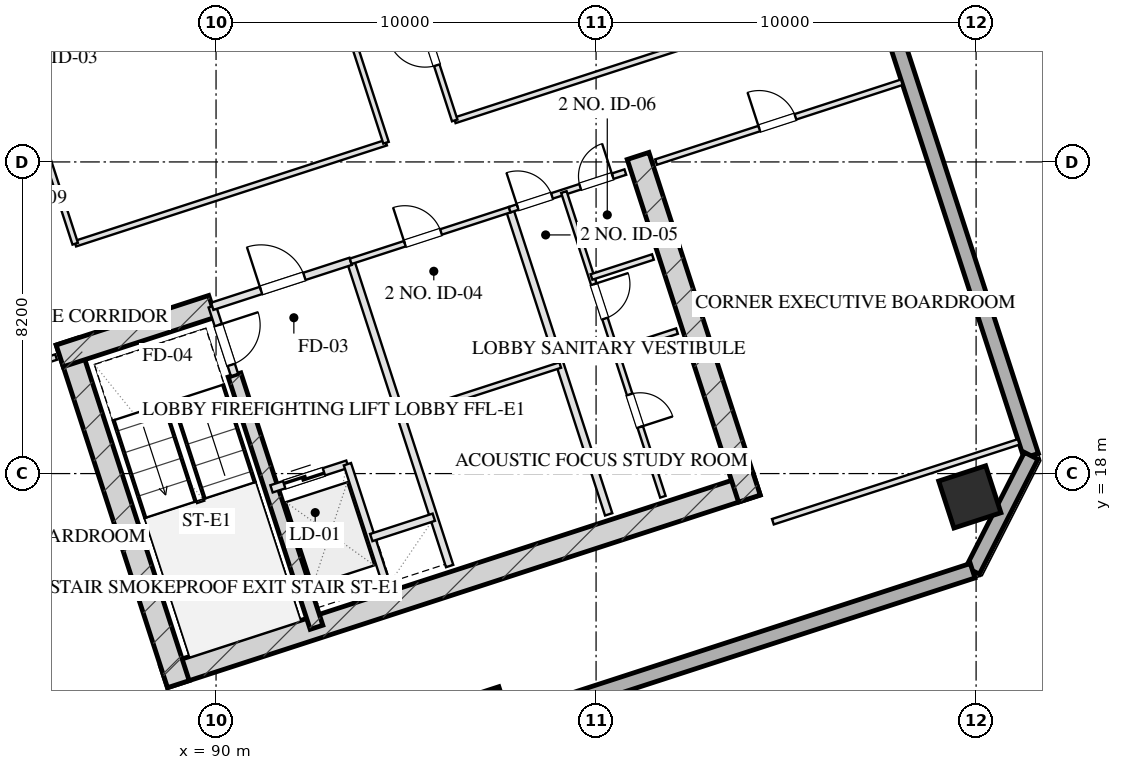
"""IFC4 building model, lengths in metres.
Left out: names, types, materials, properties, quantities, classifications, styles, units other than length and angle.
Written with IfcOpenShell. Run it as: python <this file> out.ifc"""

import sys

from ifc_helpers import new_model, si_unit, direction, frame, frame_2d, origin, origin_2d, place, context, subcontext, project, spatial, rectangle, hollow_rectangle, extrude, element, fill, save


model = new_model("IFC4")
c1 = context("Model", 3, precision=1e-05, world=origin(), true_north=direction((0.0, 1.0)))
c2 = subcontext(c1, "Body", "Model", "MODEL_VIEW")
j1 = project(units=[si_unit("LENGTHUNIT", "METRE"), si_unit("PLANEANGLEUNIT", "RADIAN")], contexts=[c1])
p1 = place(None, origin())
s1 = spatial("IfcSite", under=j1, at=p1, CompositionType="ELEMENT")
p2 = place(p1, origin())
s2 = spatial("IfcBuilding", under=s1, at=p2, CompositionType="ELEMENT")
p3 = place(p2, frame((0.0, 0.0, 170.2)))
s3 = spatial("IfcBuildingStorey", under=s2, at=p3, CompositionType="ELEMENT", Elevation=170.2)
p4 = place(p3, frame((88.63, 12.652, 0.0), z_axis=(0.0, 0.0, 1.0), x_axis=(0.95105714907, 0.309015046886, 0.0)))
e1 = element("IfcWall", 1, at=p4, inside=s3, PredefinedType="SHEAR", context=c2, shape_type="SweptSolid", body=[
    extrude(rectangle(XDim=16.4, YDim=0.6, at=frame_2d((8.2, 0.0))), origin(), (0.0, 0.0, 1.0), 3.45),
])
p5 = place(p3, frame((86.078, 21.475, 0.0), z_axis=(0.0, 0.0, 1.0), x_axis=(0.309017938678, -0.951056209472, 0.0)))
e2 = element("IfcWall", 2, at=p5, inside=s3, PredefinedType="SHEAR", context=c2, shape_type="SweptSolid", body=[
    extrude(rectangle(XDim=9.48, YDim=0.6, at=frame_2d((4.74, 0.0))), origin(), (0.0, 0.0, 1.0), 3.45),
])
p6 = place(p3, frame((101.105, 26.358, 0.0), z_axis=(0.0, 0.0, 1.0), x_axis=(0.309010370028, -0.95105866865, 0.0)))
e3 = element("IfcWall", 3, at=p6, inside=s3, PredefinedType="SHEAR", context=c2, shape_type="SweptSolid", body=[
    extrude(rectangle(XDim=9.48, YDim=0.6, at=frame_2d((4.74, 0.0))), origin(), (0.0, 0.0, 1.0), 3.45),
])
p7 = place(p3, frame((90.486, 20.594, 0.0), z_axis=(0.0, 0.0, 1.0), x_axis=(0.309020428229, -0.951055400562, 0.0)))
e4 = element("IfcWall", 4, at=p7, inside=s3, PredefinedType="SHEAR", context=c2, shape_type="SweptSolid", body=[
    extrude(rectangle(XDim=6.98, YDim=0.35, at=frame_2d((3.49, 0.0))), origin(), (0.0, 0.0, 1.0), 3.45),
])
p8 = place(p3, frame((85.886, 21.097, 0.0), z_axis=(0.0, 0.0, 1.0), x_axis=(0.951068073652, 0.308981422225, 0.0)))
e5 = element("IfcWall", 5, at=p8, inside=s3, PredefinedType="SHEAR", context=c2, shape_type="SweptSolid", body=[
    extrude(rectangle(XDim=4.22, YDim=0.6, at=frame_2d((2.11, 0.0))), origin(), (0.0, 0.0, 1.0), 3.45),
])
p9 = place(p3, frame((109.835, 17.386, 0.0), z_axis=(0.0, 0.0, 1.0), x_axis=(0.951056516295, 0.309016994375, 0.0)))
e6 = element("IfcColumn", 6, at=p9, inside=s3, PredefinedType="COLUMN", context=c2, shape_type="SweptSolid", body=[
    extrude(hollow_rectangle(XDim=1.3, YDim=1.3, WallThickness=0.045, at=origin_2d()), origin(), (0.0, 0.0, 1.0), 3.451),
])
p10 = place(p3, frame((97.185, 11.888, 0.0), z_axis=(0.0, 0.0, 1.0), x_axis=(0.951056516295, 0.309016994375, 0.0)))
e7 = element("IfcColumn", 7, at=p10, inside=s3, PredefinedType="COLUMN", context=c2, shape_type="SweptSolid", body=[
    extrude(hollow_rectangle(XDim=0.8, YDim=0.8, WallThickness=0.028, at=origin_2d()), origin(), (0.0, 0.0, 1.0), 3.451),
])
p11 = place(p3, frame((98.224, 59.173, 0.0), z_axis=(0.0, 0.0, 1.0), x_axis=(0.309014228706, -0.951057414911, 0.0)))
e8 = element("IfcWall", 8, at=p11, inside=s3, PredefinedType="SOLIDWALL", context=c2, shape_type="SweptSolid", body=[
    extrude(rectangle(XDim=42.8, YDim=0.4, at=frame_2d((21.4, 0.0))), origin(), (0.0, 0.0, 1.0), 2.61),
])
p12 = place(p11, frame((26.675, 0.0, 0.75)))
e9 = element("IfcOpeningElement", 9, at=p12, cuts=e8, PredefinedType="OPENING", context=c2, shape_type="SweptSolid", body=[
    extrude(rectangle(XDim=2.25, YDim=1.46, at=frame_2d((1.125, 0.73))), frame((0.0, 0.21, 0.0), z_axis=(0.0, -1.0, 0.0), x_axis=(1.0, 0.0, 0.0)), (0.0, 0.0, 1.0), 0.42),
])
p13 = place(p11, frame((22.875, 0.0, 0.75)))
e10 = element("IfcOpeningElement", 10, at=p13, cuts=e8, PredefinedType="OPENING", context=c2, shape_type="SweptSolid", body=[
    extrude(rectangle(XDim=2.25, YDim=1.46, at=frame_2d((1.125, 0.73))), frame((0.0, 0.21, 0.0), z_axis=(0.0, -1.0, 0.0), x_axis=(1.0, 0.0, 0.0)), (0.0, 0.0, 1.0), 0.42),
])
p14 = place(p11, frame((17.675, 0.0, 0.75)))
e11 = element("IfcOpeningElement", 11, at=p14, cuts=e8, PredefinedType="OPENING", context=c2, shape_type="SweptSolid", body=[
    extrude(rectangle(XDim=2.25, YDim=1.46, at=frame_2d((1.125, 0.73))), frame((0.0, 0.21, 0.0), z_axis=(0.0, -1.0, 0.0), x_axis=(1.0, 0.0, 0.0)), (0.0, 0.0, 1.0), 0.42),
])
p15 = place(p11, frame((13.875, 0.0, 0.75)))
e12 = element("IfcOpeningElement", 12, at=p15, cuts=e8, PredefinedType="OPENING", context=c2, shape_type="SweptSolid", body=[
    extrude(rectangle(XDim=2.25, YDim=1.46, at=frame_2d((1.125, 0.73))), frame((0.0, 0.21, 0.0), z_axis=(0.0, -1.0, 0.0), x_axis=(1.0, 0.0, 0.0)), (0.0, 0.0, 1.0), 0.42),
])
p16 = place(p3, frame((111.449, 18.468, 0.0), z_axis=(0.0, 0.0, 1.0), x_axis=(-0.454019523198, -0.890991735402, 0.0)))
e13 = element("IfcWall", 13, at=p16, inside=s3, PredefinedType="SOLIDWALL", context=c2, shape_type="SweptSolid", body=[
    extrude(rectangle(XDim=3.394, YDim=0.4, at=frame_2d((1.697, 0.0))), origin(), (0.0, 0.0, 1.0), 2.61),
])
p17 = place(p3, frame((109.908, 15.444, 0.0), z_axis=(0.0, 0.0, 1.0), x_axis=(-0.951057580055, -0.30901372044, 0.0)))
e14 = element("IfcWall", 14, at=p17, inside=s3, PredefinedType="SOLIDWALL", context=c2, shape_type="SweptSolid", body=[
    extrude(rectangle(XDim=26.4, YDim=0.4, at=frame_2d((13.2, 0.0))), origin(), (0.0, 0.0, 1.0), 2.61),
])
p18 = place(p3, frame((89.899, 22.401, 0.0), z_axis=(0.0, 0.0, 1.0), x_axis=(0.308932062672, -0.951084108086, 0.0)))
e15 = element("IfcWall", 15, at=p18, inside=s3, PredefinedType="PARTITIONING", context=c2, shape_type="SweptSolid", body=[
    extrude(rectangle(XDim=1.9, YDim=0.2, at=frame_2d((0.95, 0.0))), origin(), (0.0, 0.0, 1.0), 3.175),
])
p19 = place(p18, frame((0.52, 0.0, 0.0)))
e16 = element("IfcOpeningElement", 16, at=p19, cuts=e15, PredefinedType="OPENING", context=c2, shape_type="SweptSolid", body=[
    extrude(rectangle(XDim=1.1, YDim=2.05, at=frame_2d((0.55, 1.025))), frame((0.0, 0.11, 0.0), z_axis=(0.0, -1.0, 0.0), x_axis=(1.0, 0.0, 0.0)), (0.0, 0.0, 1.0), 0.22),
])
p20 = place(p3, frame((93.542, 23.585, 0.0), z_axis=(0.0, 0.0, 1.0), x_axis=(0.309042196757, -0.951048327176, 0.0)))
e17 = element("IfcWall", 17, at=p20, inside=s3, PredefinedType="PARTITIONING", context=c2, shape_type="SweptSolid", body=[
    extrude(rectangle(XDim=8.43, YDim=0.2, at=frame_2d((4.215, 0.0))), origin(), (0.0, 0.0, 1.0), 3.175),
])
p21 = place(p3, frame((89.899, 22.401, 0.0), z_axis=(0.0, 0.0, 1.0), x_axis=(0.951046716504, 0.309047153403, 0.0)))
e18 = element("IfcWall", 18, at=p21, inside=s3, PredefinedType="PARTITIONING", context=c2, shape_type="SweptSolid", body=[
    extrude(rectangle(XDim=3.83, YDim=0.2, at=frame_2d((1.915, 0.0))), origin(), (0.0, 0.0, 1.0), 3.175),
])
p22 = place(p21, frame((1.35, 0.0, 0.0)))
e19 = element("IfcOpeningElement", 19, at=p22, cuts=e18, PredefinedType="OPENING", context=c2, shape_type="SweptSolid", body=[
    extrude(rectangle(XDim=1.2, YDim=2.05, at=frame_2d((0.6, 1.025))), frame((0.0, 0.11, 0.0), z_axis=(0.0, -1.0, 0.0), x_axis=(1.0, 0.0, 0.0)), (0.0, 0.0, 1.0), 0.22),
])
p23 = place(p3, frame((91.46, 17.598, 0.0), z_axis=(0.0, 0.0, 1.0), x_axis=(0.951062257173, 0.308999325213, 0.0)))
e20 = element("IfcWall", 20, at=p23, inside=s3, PredefinedType="PARTITIONING", context=c2, shape_type="SweptSolid", body=[
    extrude(rectangle(XDim=2.1, YDim=0.2, at=frame_2d((1.05, 0.0))), origin(), (0.0, 0.0, 1.0), 3.175),
])
p24 = place(p23, frame((0.35, 0.0, 0.0)))
e21 = element("IfcOpeningElement", 21, at=p24, cuts=e20, PredefinedType="OPENING", context=c2, shape_type="SweptSolid", body=[
    extrude(rectangle(XDim=1.1, YDim=2.05, at=frame_2d((0.55, 1.025))), frame((0.0, 0.11, 0.0), z_axis=(0.0, -1.0, 0.0), x_axis=(1.0, 0.0, 0.0)), (0.0, 0.0, 1.0), 0.22),
])
p25 = place(p3, frame((93.457, 18.247, 0.0), z_axis=(0.0, 0.0, 1.0), x_axis=(0.3089935693, -0.951064127245, 0.0)))
e22 = element("IfcWall", 22, at=p25, inside=s3, PredefinedType="PARTITIONING", context=c2, shape_type="SweptSolid", body=[
    extrude(rectangle(XDim=3.7, YDim=0.2, at=frame_2d((1.85, 0.0))), origin(), (0.0, 0.0, 1.0), 3.175),
])
p26 = place(p3, frame((94.084, 16.317, 0.0), z_axis=(0.0, 0.0, 1.0), x_axis=(0.951041328149, 0.309063734775, 0.0)))
e23 = element("IfcWall", 23, at=p26, inside=s3, PredefinedType="PARTITIONING", context=c2, shape_type="SweptSolid", body=[
    extrude(rectangle(XDim=1.73, YDim=0.2, at=frame_2d((0.865, 0.0))), origin(), (0.0, 0.0, 1.0), 3.175),
])
p27 = place(p3, frame((97.727, 24.944, 0.0), z_axis=(0.0, 0.0, 1.0), x_axis=(0.309016001439, -0.951056838919, 0.0)))
e24 = element("IfcWall", 24, at=p27, inside=s3, PredefinedType="PARTITIONING", context=c2, shape_type="SweptSolid", body=[
    extrude(rectangle(XDim=8.43, YDim=0.2, at=frame_2d((4.215, 0.0))), origin(), (0.0, 0.0, 1.0), 3.175),
])
p28 = place(p3, frame((93.542, 23.585, 0.0), z_axis=(0.0, 0.0, 1.0), x_axis=(0.951063829732, 0.308994485023, 0.0)))
e25 = element("IfcWall", 25, at=p28, inside=s3, PredefinedType="PARTITIONING", context=c2, shape_type="SweptSolid", body=[
    extrude(rectangle(XDim=4.4, YDim=0.15, at=frame_2d((2.2, 0.0))), origin(), (0.0, 0.0, 1.0), 3.175),
])
p29 = place(p28, frame((1.5, 0.0, 0.0)))
e26 = element("IfcOpeningElement", 26, at=p29, cuts=e25, PredefinedType="OPENING", context=c2, shape_type="SweptSolid", body=[
    extrude(rectangle(XDim=1.0, YDim=2.05, at=frame_2d((0.5, 1.025))), frame((0.0, 0.085, 0.0), z_axis=(0.0, -1.0, 0.0), x_axis=(1.0, 0.0, 0.0)), (0.0, 0.0, 1.0), 0.17),
])
p30 = place(p3, frame((94.871, 19.495, 0.0), z_axis=(0.0, 0.0, 1.0), x_axis=(0.951042223598, 0.309060979314, 0.0)))
e27 = element("IfcWall", 27, at=p30, inside=s3, PredefinedType="PARTITIONING", context=c2, shape_type="SweptSolid", body=[
    extrude(rectangle(XDim=4.4, YDim=0.15, at=frame_2d((2.2, 0.0))), origin(), (0.0, 0.0, 1.0), 3.175),
])
p31 = place(p3, frame((97.727, 24.944, 0.0), z_axis=(0.0, 0.0, 1.0), x_axis=(0.951036872128, 0.309077446369, 0.0)))
e28 = element("IfcWall", 28, at=p31, inside=s3, PredefinedType="PARTITIONING", context=c2, shape_type="SweptSolid", body=[
    extrude(rectangle(XDim=3.2, YDim=0.15, at=frame_2d((1.6, 0.0))), origin(), (0.0, 0.0, 1.0), 3.175),
])
p32 = place(p31, frame((0.22, 0.0, 0.0)))
e29 = element("IfcOpeningElement", 29, at=p32, cuts=e28, PredefinedType="OPENING", context=c2, shape_type="SweptSolid", body=[
    extrude(rectangle(XDim=0.95, YDim=2.05, at=frame_2d((0.475, 1.025))), frame((0.0, 0.085, 0.0), z_axis=(0.0, -1.0, 0.0), x_axis=(1.0, 0.0, 0.0)), (0.0, 0.0, 1.0), 0.17),
])
p33 = place(p31, frame((1.95, 0.0, 0.0)))
e30 = element("IfcOpeningElement", 30, at=p33, cuts=e28, PredefinedType="OPENING", context=c2, shape_type="SweptSolid", body=[
    extrude(rectangle(XDim=0.9, YDim=2.05, at=frame_2d((0.45, 1.025))), frame((0.0, 0.085, 0.0), z_axis=(0.0, -1.0, 0.0), x_axis=(1.0, 0.0, 0.0)), (0.0, 0.0, 1.0), 0.17),
])
p34 = place(p3, frame((99.153, 25.408, 0.0), z_axis=(0.0, 0.0, 1.0), x_axis=(0.309016001439, -0.951056838919, 0.0)))
e31 = element("IfcWall", 31, at=p34, inside=s3, PredefinedType="PARTITIONING", context=c2, shape_type="SweptSolid", body=[
    extrude(rectangle(XDim=8.43, YDim=0.15, at=frame_2d((4.215, 0.0))), origin(), (0.0, 0.0, 1.0), 3.175),
])
p35 = place(p34, frame((2.55, 0.0, 0.0)))
e32 = element("IfcOpeningElement", 32, at=p35, cuts=e31, PredefinedType="OPENING", context=c2, shape_type="SweptSolid", body=[
    extrude(rectangle(XDim=0.95, YDim=2.05, at=frame_2d((0.475, 1.025))), frame((0.0, 0.085, 0.0), z_axis=(0.0, -1.0, 0.0), x_axis=(1.0, 0.0, 0.0)), (0.0, 0.0, 1.0), 0.17),
])
p36 = place(p34, frame((5.6, 0.0, 0.0)))
e33 = element("IfcOpeningElement", 33, at=p36, cuts=e31, PredefinedType="OPENING", context=c2, shape_type="SweptSolid", body=[
    extrude(rectangle(XDim=0.9, YDim=2.05, at=frame_2d((0.45, 1.025))), frame((0.0, 0.085, 0.0), z_axis=(0.0, -1.0, 0.0), x_axis=(1.0, 0.0, 0.0)), (0.0, 0.0, 1.0), 0.17),
])
for number, where, z_axis, x_axis in (
    (34, (100.513, 21.223, 0.0), (0.0, 0.0, 1.0), (0.951, 0.309, 0.0)),
    (35, (99.879, 23.173, 0.0), (0.0, 0.0, 1.0), (0.951, 0.309, 0.0)),
):
    element("IfcWall", number, at=place(p3, frame(where, z_axis=z_axis, x_axis=x_axis)), inside=s3, PredefinedType="PARTITIONING", context=c2, shape_type="SweptSolid", body=[
        extrude(rectangle(XDim=1.7, YDim=0.15, at=frame_2d((0.85, 0.0))), origin(), (0.0, 0.0, 1.0), 3.175),
    ])
p37 = place(p3, frame((78.753, 18.78, 0.0), z_axis=(0.0, 0.0, 1.0), x_axis=(0.951060977215, 0.309003264738, 0.0)))
e36 = element("IfcWall", 36, at=p37, inside=s3, PredefinedType="PARTITIONING", context=c2, shape_type="SweptSolid", body=[
    extrude(rectangle(XDim=7.4, YDim=0.15, at=frame_2d((3.7, 0.0))), origin(), (0.0, 0.0, 1.0), 3.175),
])
p38 = place(p37, frame((3.108, 0.0, 0.0)))
e37 = element("IfcOpeningElement", 37, at=p38, cuts=e36, PredefinedType="OPENING", context=c2, shape_type="SweptSolid", body=[
    extrude(rectangle(XDim=1.0, YDim=2.05, at=frame_2d((0.5, 1.025))), frame((0.0, 0.085, 0.0), z_axis=(0.0, -1.0, 0.0), x_axis=(1.0, 0.0, 0.0)), (0.0, 0.0, 1.0), 0.17),
])
p39 = place(p3, frame((104.653, 16.733, 0.0), z_axis=(0.0, 0.0, 1.0), x_axis=(0.951054383043, 0.309023559774, 0.0)))
e38 = element("IfcWall", 38, at=p39, inside=s3, PredefinedType="PARTITIONING", context=c2, shape_type="SweptSolid", body=[
    extrude(rectangle(XDim=6.8, YDim=0.15, at=frame_2d((3.4, 0.0))), origin(), (0.0, 0.0, 1.0), 3.175),
])
p40 = place(p3, frame((101.578, 26.196, 0.0), z_axis=(0.0, 0.0, 1.0), x_axis=(0.951064934653, 0.308991084134, 0.0)))
e39 = element("IfcWall", 39, at=p40, inside=s3, PredefinedType="PARTITIONING", context=c2, shape_type="SweptSolid", body=[
    extrude(rectangle(XDim=6.8, YDim=0.15, at=frame_2d((3.4, 0.0))), origin(), (0.0, 0.0, 1.0), 3.175),
])
p41 = place(p40, frame((2.856, 0.0, 0.0)))
e40 = element("IfcOpeningElement", 40, at=p41, cuts=e39, PredefinedType="OPENING", context=c2, shape_type="SweptSolid", body=[
    extrude(rectangle(XDim=1.0, YDim=2.05, at=frame_2d((0.5, 1.025))), frame((0.0, 0.085, 0.0), z_axis=(0.0, -1.0, 0.0), x_axis=(1.0, 0.0, 0.0)), (0.0, 0.0, 1.0), 0.17),
])
p42 = place(p3, frame((86.294, 24.048, 0.0), z_axis=(0.0, 0.0, 1.0), x_axis=(0.951052008164, 0.309030868631, 0.0)))
e41 = element("IfcWall", 41, at=p42, inside=s3, PredefinedType="PARTITIONING", context=c2, shape_type="SweptSolid", body=[
    extrude(rectangle(XDim=8.6, YDim=0.15, at=frame_2d((4.3, 0.0))), origin(), (0.0, 0.0, 1.0), 3.175),
])
p43 = place(p3, frame((96.28, 27.292, 0.0), z_axis=(0.0, 0.0, 1.0), x_axis=(0.951056999652, 0.309015506751, 0.0)))
e42 = element("IfcWall", 42, at=p43, inside=s3, PredefinedType="PARTITIONING", context=c2, shape_type="SweptSolid", body=[
    extrude(rectangle(XDim=11.5, YDim=0.15, at=frame_2d((5.75, 0.0))), origin(), (0.0, 0.0, 1.0), 3.175),
])
p44 = place(p3, frame((86.294, 24.048, 0.0), z_axis=(0.0, 0.0, 1.0), x_axis=(-0.309004459387, 0.951060589068, 0.0)))
e43 = element("IfcWall", 43, at=p44, inside=s3, PredefinedType="PARTITIONING", context=c2, shape_type="SweptSolid", body=[
    extrude(rectangle(XDim=16.64, YDim=0.15, at=frame_2d((8.32, 0.0))), origin(), (0.0, 0.0, 1.0), 3.175),
])
p45 = place(p44, frame((4.284, 0.0, 0.0)))
e44 = element("IfcOpeningElement", 44, at=p45, cuts=e43, PredefinedType="OPENING", context=c2, shape_type="SweptSolid", body=[
    extrude(rectangle(XDim=1.1, YDim=2.05, at=frame_2d((0.55, 1.025))), frame((0.0, 0.085, 0.0), z_axis=(0.0, -1.0, 0.0), x_axis=(1.0, 0.0, 0.0)), (0.0, 0.0, 1.0), 0.17),
])
p46 = place(p44, frame((12.724, 0.0, 0.0)))
e45 = element("IfcOpeningElement", 45, at=p46, cuts=e43, PredefinedType="OPENING", context=c2, shape_type="SweptSolid", body=[
    extrude(rectangle(XDim=1.1, YDim=2.05, at=frame_2d((0.55, 1.025))), frame((0.0, 0.085, 0.0), z_axis=(0.0, -1.0, 0.0), x_axis=(1.0, 0.0, 0.0)), (0.0, 0.0, 1.0), 0.17),
])
p47 = place(p3, frame((94.473, 26.705, 0.0), z_axis=(0.0, 0.0, 1.0), x_axis=(-0.309022042254, 0.951054876125, 0.0)))
e46 = element("IfcWall", 46, at=p47, inside=s3, PredefinedType="PARTITIONING", context=c2, shape_type="SweptSolid", body=[
    extrude(rectangle(XDim=16.64, YDim=0.15, at=frame_2d((8.32, 0.0))), origin(), (0.0, 0.0, 1.0), 3.175),
])
p48 = place(p3, frame((96.28, 27.292, 0.0), z_axis=(0.0, 0.0, 1.0), x_axis=(-0.309008771245, 0.951059188113, 0.0)))
e47 = element("IfcWall", 47, at=p48, inside=s3, PredefinedType="PARTITIONING", context=c2, shape_type="SweptSolid", body=[
    extrude(rectangle(XDim=16.64, YDim=0.15, at=frame_2d((8.32, 0.0))), origin(), (0.0, 0.0, 1.0), 3.175),
])
p49 = place(p48, frame((1.526, 0.0, 0.0)))
e48 = element("IfcOpeningElement", 48, at=p49, cuts=e47, PredefinedType="OPENING", context=c2, shape_type="SweptSolid", body=[
    extrude(rectangle(XDim=1.0, YDim=2.05, at=frame_2d((0.5, 1.025))), frame((0.0, 0.085, 0.0), z_axis=(0.0, -1.0, 0.0), x_axis=(1.0, 0.0, 0.0)), (0.0, 0.0, 1.0), 0.17),
])
p50 = place(p48, frame((6.026, 0.0, 0.0)))
e49 = element("IfcOpeningElement", 49, at=p50, cuts=e47, PredefinedType="OPENING", context=c2, shape_type="SweptSolid", body=[
    extrude(rectangle(XDim=1.0, YDim=2.05, at=frame_2d((0.5, 1.025))), frame((0.0, 0.085, 0.0), z_axis=(0.0, -1.0, 0.0), x_axis=(1.0, 0.0, 0.0)), (0.0, 0.0, 1.0), 0.17),
])
p51 = place(p48, frame((10.519, 0.0, 0.0)))
e50 = element("IfcOpeningElement", 50, at=p51, cuts=e47, PredefinedType="OPENING", context=c2, shape_type="SweptSolid", body=[
    extrude(rectangle(XDim=1.0, YDim=2.05, at=frame_2d((0.5, 1.025))), frame((0.0, 0.085, 0.0), z_axis=(0.0, -1.0, 0.0), x_axis=(1.0, 0.0, 0.0)), (0.0, 0.0, 1.0), 0.17),
])
p52 = place(p48, frame((14.338, 0.0, 0.0)))
e51 = element("IfcOpeningElement", 51, at=p52, cuts=e47, PredefinedType="OPENING", context=c2, shape_type="SweptSolid", body=[
    extrude(rectangle(XDim=1.0, YDim=2.05, at=frame_2d((0.5, 1.025))), frame((0.0, 0.085, 0.0), z_axis=(0.0, -1.0, 0.0), x_axis=(1.0, 0.0, 0.0)), (0.0, 0.0, 1.0), 0.17),
])
p53 = place(p19, origin())
e52 = element("IfcDoor", 52, at=p53, inside=s3, OperationType="SINGLE_SWING_LEFT", PredefinedType="DOOR", context=c2, shape_type="SweptSolid", body=[
    extrude(rectangle(XDim=1.1, YDim=2.05, at=frame_2d((0.55, 1.025))), frame((0.0, 0.025, 0.0), z_axis=(0.0, -1.0, 0.0), x_axis=(1.0, 0.0, 0.0)), (0.0, 0.0, 1.0), 0.05),
])
fill(e16, e52)
p54 = place(p22, origin())
e53 = element("IfcDoor", 53, at=p54, inside=s3, OperationType="SINGLE_SWING_LEFT", PredefinedType="DOOR", context=c2, shape_type="SweptSolid", body=[
    extrude(rectangle(XDim=1.2, YDim=2.05, at=frame_2d((0.6, 1.025))), frame((0.0, 0.025, 0.0), z_axis=(0.0, -1.0, 0.0), x_axis=(1.0, 0.0, 0.0)), (0.0, 0.0, 1.0), 0.05),
])
fill(e19, e53)
p55 = place(p24, origin())
e54 = element("IfcDoor", 54, at=p55, inside=s3, OperationType="DOUBLE_DOOR_SLIDING", PredefinedType="DOOR", context=c2, shape_type="SweptSolid", body=[
    extrude(rectangle(XDim=1.1, YDim=2.05, at=frame_2d((0.55, 1.025))), frame((0.0, 0.025, 0.0), z_axis=(0.0, -1.0, 0.0), x_axis=(1.0, 0.0, 0.0)), (0.0, 0.0, 1.0), 0.05),
])
fill(e21, e54)
p56 = place(p29, origin())
e55 = element("IfcDoor", 55, at=p56, inside=s3, OperationType="SINGLE_SWING_LEFT", PredefinedType="DOOR", context=c2, shape_type="SweptSolid", body=[
    extrude(rectangle(XDim=1.0, YDim=2.05, at=frame_2d((0.5, 1.025))), frame((0.0, 0.025, 0.0), z_axis=(0.0, -1.0, 0.0), x_axis=(1.0, 0.0, 0.0)), (0.0, 0.0, 1.0), 0.05),
])
fill(e26, e55)
p57 = place(p32, origin())
e56 = element("IfcDoor", 56, at=p57, inside=s3, OperationType="SINGLE_SWING_LEFT", PredefinedType="DOOR", context=c2, shape_type="SweptSolid", body=[
    extrude(rectangle(XDim=0.95, YDim=2.05, at=frame_2d((0.475, 1.025))), frame((0.0, 0.025, 0.0), z_axis=(0.0, -1.0, 0.0), x_axis=(1.0, 0.0, 0.0)), (0.0, 0.0, 1.0), 0.05),
])
fill(e29, e56)
p58 = place(p33, origin())
e57 = element("IfcDoor", 57, at=p58, inside=s3, OperationType="SINGLE_SWING_RIGHT", PredefinedType="DOOR", context=c2, shape_type="SweptSolid", body=[
    extrude(rectangle(XDim=0.9, YDim=2.05, at=frame_2d((0.45, 1.025))), frame((0.0, 0.025, 0.0), z_axis=(0.0, -1.0, 0.0), x_axis=(1.0, 0.0, 0.0)), (0.0, 0.0, 1.0), 0.05),
])
fill(e30, e57)
p59 = place(p35, origin())
e58 = element("IfcDoor", 58, at=p59, inside=s3, OperationType="SINGLE_SWING_LEFT", PredefinedType="DOOR", context=c2, shape_type="SweptSolid", body=[
    extrude(rectangle(XDim=0.95, YDim=2.05, at=frame_2d((0.475, 1.025))), frame((0.0, 0.025, 0.0), z_axis=(0.0, -1.0, 0.0), x_axis=(1.0, 0.0, 0.0)), (0.0, 0.0, 1.0), 0.05),
])
fill(e32, e58)
p60 = place(p36, origin())
e59 = element("IfcDoor", 59, at=p60, inside=s3, OperationType="SINGLE_SWING_RIGHT", PredefinedType="DOOR", context=c2, shape_type="SweptSolid", body=[
    extrude(rectangle(XDim=0.9, YDim=2.05, at=frame_2d((0.45, 1.025))), frame((0.0, 0.025, 0.0), z_axis=(0.0, -1.0, 0.0), x_axis=(1.0, 0.0, 0.0)), (0.0, 0.0, 1.0), 0.05),
])
fill(e33, e59)
p61 = place(p41, origin())
e60 = element("IfcDoor", 60, at=p61, inside=s3, OperationType="SINGLE_SWING_LEFT", PredefinedType="DOOR", context=c2, shape_type="SweptSolid", body=[
    extrude(rectangle(XDim=1.0, YDim=2.05, at=frame_2d((0.5, 1.025))), frame((0.0, 0.025, 0.0), z_axis=(0.0, -1.0, 0.0), x_axis=(1.0, 0.0, 0.0)), (0.0, 0.0, 1.0), 0.05),
])
fill(e40, e60)
p62 = place(p49, origin())
e61 = element("IfcDoor", 61, at=p62, inside=s3, OperationType="SINGLE_SWING_RIGHT", PredefinedType="DOOR", context=c2, shape_type="SweptSolid", body=[
    extrude(rectangle(XDim=1.0, YDim=2.05, at=frame_2d((0.5, 1.025))), frame((0.0, 0.025, 0.0), z_axis=(0.0, -1.0, 0.0), x_axis=(1.0, 0.0, 0.0)), (0.0, 0.0, 1.0), 0.05),
])
fill(e48, e61)
save(model, sys.argv[1])
